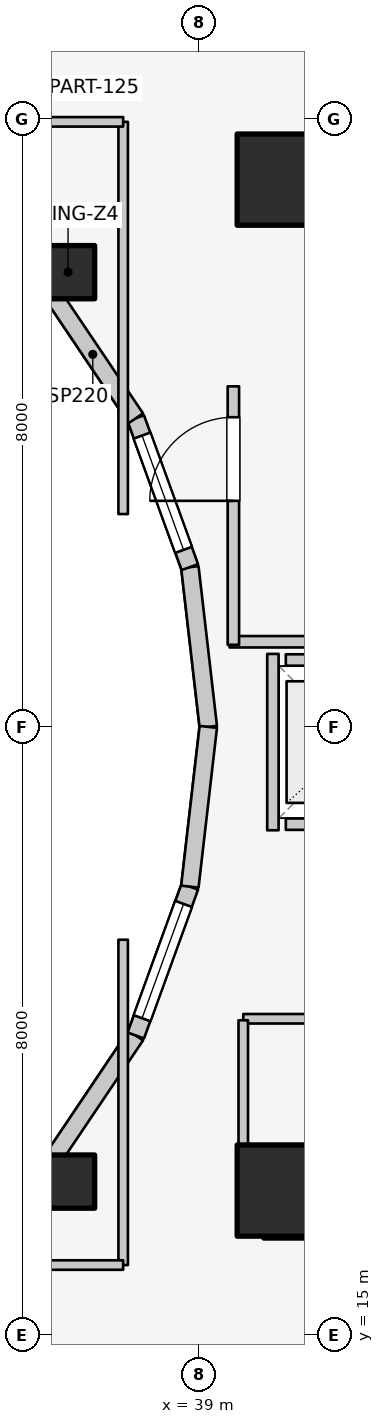
"""IFC4 building model, lengths in metres.
Left out: names, types, materials, properties, quantities, classifications, styles, units other than length and angle.
Written with IfcOpenShell. Run it as: python <this file> out.ifc"""

import sys

from ifc_helpers import new_model, si_unit, direction, frame, frame_2d, origin, origin_2d, place, context, subcontext, project, spatial, rectangle, extrude, element, fill, save


model = new_model("IFC4")
c1 = context("Model", 3, precision=1e-05, world=origin(), true_north=direction((0.0, 1.0)))
c2 = subcontext(c1, "Body", "Model", "MODEL_VIEW")
j1 = project(units=[si_unit("LENGTHUNIT", "METRE"), si_unit("PLANEANGLEUNIT", "RADIAN")], contexts=[c1])
p1 = place(None, origin())
s1 = spatial("IfcSite", under=j1, at=p1, CompositionType="ELEMENT")
p2 = place(p1, origin())
s2 = spatial("IfcBuilding", under=s1, at=p2, CompositionType="ELEMENT")
p3 = place(p2, frame((0.0, 0.0, 214.0)))
s3 = spatial("IfcBuildingStorey", under=s2, at=p3, CompositionType="ELEMENT", Elevation=214.0)
for number, where, z_axis, x_axis in (
    (1, (39.85, 16.55, 0.0), (0.0, 0.0, 1.0), (1.0, 0.0, 0.0)),
    (2, (39.85, 30.35, 0.0), (0.0, 0.0, 1.0), (1.0, 0.0, 0.0)),
):
    element("IfcWall", number, at=place(p3, frame(where, z_axis=z_axis, x_axis=x_axis)), inside=s3, PredefinedType="SHEAR", context=c2, shape_type="SweptSolid", body=[
        extrude(rectangle(XDim=4.5, YDim=0.55, at=frame_2d((2.25, 0.0))), origin(), (0.0, 0.0, 1.0), 3.1),
    ])
for number, where, z_axis, x_axis in (
    (3, (40.1, 16.9, 0.0), (0.0, 0.0, 1.0), (1.0, 0.0, 0.0)),
    (4, (40.1, 30.2, 0.0), (0.0, 0.0, 1.0), (1.0, 0.0, 0.0)),
):
    element("IfcColumn", number, at=place(p3, frame(where, z_axis=z_axis, x_axis=x_axis)), inside=s3, PredefinedType="COLUMN", context=c2, shape_type="SweptSolid", body=[
        extrude(rectangle(XDim=1.2, YDim=1.2, at=origin_2d()), origin(), (0.0, 0.0, 1.0), 3.1),
    ])
for number, where, z_axis, x_axis in (
    (5, (37.275, 28.982, 0.0), (0.0, 0.0, 1.0), (1.0, 0.0, 0.0)),
    (6, (37.275, 17.018, 0.0), (0.0, 0.0, 1.0), (1.0, 0.0, 0.0)),
):
    element("IfcColumn", number, at=place(p3, frame(where, z_axis=z_axis, x_axis=x_axis)), inside=s3, PredefinedType="COLUMN", context=c2, shape_type="SweptSolid", body=[
        extrude(rectangle(XDim=0.7, YDim=0.7, at=origin_2d()), origin(), (0.0, 0.0, 1.0), 3.1),
    ])
p4 = place(p3, frame((39.12, 23.0, 0.0), z_axis=(0.0, 0.0, 1.0), x_axis=(-0.114711713601, 0.993398823617, 0.0)))
e7 = element("IfcWall", 7, at=p4, inside=s3, PredefinedType="STANDARD", context=c2, shape_type="SweptSolid", body=[
    extrude(rectangle(XDim=2.115, YDim=0.23, at=frame_2d((1.058, 0.0))), origin(), (0.0, 0.0, 1.0), 2.84),
])
p5 = place(p3, frame((38.877, 25.102, 0.0), z_axis=(0.0, 0.0, 1.0), x_axis=(-0.341423187295, 0.93990968033, 0.0)))
e8 = element("IfcWall", 8, at=p5, inside=s3, PredefinedType="STANDARD", context=c2, shape_type="SweptSolid", body=[
    extrude(rectangle(XDim=2.084, YDim=0.23, at=frame_2d((1.042, 0.0))), origin(), (0.0, 0.0, 1.0), 2.84),
])
p6 = place(p5, frame((0.242, 0.0, 0.85)))
e9 = element("IfcOpeningElement", 9, at=p6, cuts=e8, PredefinedType="OPENING", context=c2, shape_type="SweptSolid", body=[
    extrude(rectangle(XDim=1.6, YDim=1.65, at=frame_2d((0.8, 0.825))), frame((0.0, 0.125, 0.0), z_axis=(0.0, -1.0, 0.0), x_axis=(1.0, 0.0, 0.0)), (0.0, 0.0, 1.0), 0.25),
])
p7 = place(p3, frame((38.166, 27.06, 0.0), z_axis=(0.0, 0.0, 1.0), x_axis=(-0.558197800898, 0.829707909492, 0.0)))
e10 = element("IfcWall", 10, at=p7, inside=s3, PredefinedType="STANDARD", context=c2, shape_type="SweptSolid", body=[
    extrude(rectangle(XDim=2.027, YDim=0.23, at=frame_2d((1.013, 0.0))), origin(), (0.0, 0.0, 1.0), 2.16),
])
for number, where, z_axis, x_axis in (
    (11, (37.035, 28.742, 0.0), (0.0, 0.0, 1.0), (-0.753, 0.659, 0.0)),
    (12, (35.56, 15.968, 0.0), (0.0, 0.0, 1.0), (0.753, 0.659, 0.0)),
):
    element("IfcWall", number, at=place(p3, frame(where, z_axis=z_axis, x_axis=x_axis)), inside=s3, PredefinedType="STANDARD", context=c2, shape_type="SweptSolid", body=[
        extrude(rectangle(XDim=1.959, YDim=0.23, at=frame_2d((0.98, 0.0))), origin(), (0.0, 0.0, 1.0), 2.16),
    ])
p8 = place(p3, frame((37.035, 17.258, 0.0), z_axis=(0.0, 0.0, 1.0), x_axis=(0.558197800898, 0.829707909492, 0.0)))
e13 = element("IfcWall", 13, at=p8, inside=s3, PredefinedType="STANDARD", context=c2, shape_type="SweptSolid", body=[
    extrude(rectangle(XDim=2.027, YDim=0.23, at=frame_2d((1.013, 0.0))), origin(), (0.0, 0.0, 1.0), 2.16),
])
p9 = place(p3, frame((38.166, 18.94, 0.0), z_axis=(0.0, 0.0, 1.0), x_axis=(0.341423187295, 0.93990968033, 0.0)))
e14 = element("IfcWall", 14, at=p9, inside=s3, PredefinedType="STANDARD", context=c2, shape_type="SweptSolid", body=[
    extrude(rectangle(XDim=2.084, YDim=0.23, at=frame_2d((1.042, 0.0))), origin(), (0.0, 0.0, 1.0), 2.84),
])
p10 = place(p9, frame((0.242, 0.0, 0.85)))
e15 = element("IfcOpeningElement", 15, at=p10, cuts=e14, PredefinedType="OPENING", context=c2, shape_type="SweptSolid", body=[
    extrude(rectangle(XDim=1.6, YDim=1.65, at=frame_2d((0.8, 0.825))), frame((0.0, 0.125, 0.0), z_axis=(0.0, -1.0, 0.0), x_axis=(1.0, 0.0, 0.0)), (0.0, 0.0, 1.0), 0.25),
])
p11 = place(p3, frame((38.877, 20.898, 0.0), z_axis=(0.0, 0.0, 1.0), x_axis=(0.114711713601, 0.993398823617, 0.0)))
e16 = element("IfcWall", 16, at=p11, inside=s3, PredefinedType="STANDARD", context=c2, shape_type="SweptSolid", body=[
    extrude(rectangle(XDim=2.115, YDim=0.23, at=frame_2d((1.058, 0.0))), origin(), (0.0, 0.0, 1.0), 2.84),
])
p12 = place(p3, frame((40.14, 21.72, 0.0), z_axis=(0.0, 0.0, 1.0), x_axis=(1.0, 0.0, 0.0)))
e17 = element("IfcWall", 17, at=p12, inside=s3, PredefinedType="SOLIDWALL", context=c2, shape_type="SweptSolid", body=[
    extrude(rectangle(XDim=1.82, YDim=0.15, at=frame_2d((0.91, 0.0))), origin(), (0.0, 0.0, 1.0), 2.12),
])
p13 = place(p12, frame((0.36, 0.0, 0.0)))
e18 = element("IfcOpeningElement", 18, at=p13, cuts=e17, PredefinedType="OPENING", context=c2, shape_type="SweptSolid", body=[
    extrude(rectangle(XDim=1.1, YDim=2.1, at=frame_2d((0.55, 1.05))), frame((0.0, 0.085, 0.0), z_axis=(0.0, -1.0, 0.0), x_axis=(1.0, 0.0, 0.0)), (0.0, 0.0, 1.0), 0.17),
])
p14 = place(p3, frame((40.14, 23.88, 0.0), z_axis=(0.0, 0.0, 1.0), x_axis=(1.0, 0.0, 0.0)))
e19 = element("IfcWall", 19, at=p14, inside=s3, PredefinedType="SOLIDWALL", context=c2, shape_type="SweptSolid", body=[
    extrude(rectangle(XDim=1.82, YDim=0.15, at=frame_2d((0.91, 0.0))), origin(), (0.0, 0.0, 1.0), 2.12),
])
p15 = place(p3, frame((39.97, 21.64, 0.0), z_axis=(0.0, 0.0, 1.0), x_axis=(0.0, 1.0, 0.0)))
e20 = element("IfcWall", 20, at=p15, inside=s3, PredefinedType="SOLIDWALL", context=c2, shape_type="SweptSolid", body=[
    extrude(rectangle(XDim=2.32, YDim=0.15, at=frame_2d((1.16, 0.0))), origin(), (0.0, 0.0, 1.0), 2.12),
])
p16 = place(p3, frame((39.4, 24.12, 0.0), z_axis=(0.0, 0.0, 1.0), x_axis=(1.0, 0.0, 0.0)))
e21 = element("IfcWall", 21, at=p16, inside=s3, PredefinedType="PARTITIONING", context=c2, shape_type="SweptSolid", body=[
    extrude(rectangle(XDim=5.08, YDim=0.15, at=frame_2d((2.54, 0.0))), origin(), (0.0, 0.0, 1.0), 2.12),
])
p17 = place(p3, frame((39.45, 24.08, 0.0), z_axis=(0.0, 0.0, 1.0), x_axis=(0.0, 1.0, 0.0)))
e22 = element("IfcWall", 22, at=p17, inside=s3, PredefinedType="PARTITIONING", context=c2, shape_type="SweptSolid", body=[
    extrude(rectangle(XDim=3.4, YDim=0.15, at=frame_2d((1.7, 0.0))), origin(), (0.0, 0.0, 1.0), 2.855),
])
p18 = place(p17, frame((1.894, 0.0, 0.0)))
e23 = element("IfcOpeningElement", 23, at=p18, cuts=e22, PredefinedType="OPENING", context=c2, shape_type="SweptSolid", body=[
    extrude(rectangle(XDim=1.1, YDim=2.1, at=frame_2d((0.55, 1.05))), frame((0.0, 0.085, 0.0), z_axis=(0.0, -1.0, 0.0), x_axis=(1.0, 0.0, 0.0)), (0.0, 0.0, 1.0), 0.17),
])
p19 = place(p3, frame((39.58, 19.16, 0.0), z_axis=(0.0, 0.0, 1.0), x_axis=(1.0, 0.0, 0.0)))
e24 = element("IfcWall", 24, at=p19, inside=s3, PredefinedType="PARTITIONING", context=c2, shape_type="SweptSolid", body=[
    extrude(rectangle(XDim=4.87, YDim=0.125, at=frame_2d((2.435, 0.0))), origin(), (0.0, 0.0, 1.0), 2.12),
])
p20 = place(p19, frame((1.748, 0.0, 0.0)))
e25 = element("IfcOpeningElement", 25, at=p20, cuts=e24, PredefinedType="OPENING", context=c2, shape_type="SweptSolid", body=[
    extrude(rectangle(XDim=0.85, YDim=2.05, at=frame_2d((0.425, 1.025))), frame((0.0, 0.073, 0.0), z_axis=(0.0, -1.0, 0.0), x_axis=(1.0, 0.0, 0.0)), (0.0, 0.0, 1.0), 0.145),
])
p21 = place(p3, frame((39.58, 17.1, 0.0), z_axis=(0.0, 0.0, 1.0), x_axis=(0.0, 1.0, 0.0)))
e26 = element("IfcWall", 26, at=p21, inside=s3, PredefinedType="PARTITIONING", context=c2, shape_type="SweptSolid", body=[
    extrude(rectangle(XDim=2.04, YDim=0.125, at=frame_2d((1.02, 0.0))), origin(), (0.0, 0.0, 1.0), 2.232),
])
p22 = place(p3, frame((35.55, 30.015, 0.0), z_axis=(0.0, 0.0, 1.0), x_axis=(0.522763432117, 0.852477796802, 0.0)))
e27 = element("IfcWall", 27, at=p22, inside=s3, PredefinedType="PARTITIONING", context=c2, shape_type="SweptSolid", body=[
    extrude(rectangle(XDim=3.269, YDim=0.125, at=frame_2d((1.635, 0.0))), origin(), (0.0, 0.0, 1.0), 2.376),
])
p23 = place(p3, frame((35.55, 15.985, 0.0), z_axis=(0.0, 0.0, 1.0), x_axis=(0.52592395012, -0.850531597702, 0.0)))
e28 = element("IfcWall", 28, at=p23, inside=s3, PredefinedType="PARTITIONING", context=c2, shape_type="SweptSolid", body=[
    extrude(rectangle(XDim=2.869, YDim=0.125, at=frame_2d((1.435, 0.0))), origin(), (0.0, 0.0, 1.0), 2.376),
])
p24 = place(p3, frame((38.0, 25.8, 0.0), z_axis=(0.0, 0.0, 1.0), x_axis=(0.0, 1.0, 0.0)))
e29 = element("IfcWall", 29, at=p24, inside=s3, PredefinedType="PARTITIONING", context=c2, shape_type="SweptSolid", body=[
    extrude(rectangle(XDim=5.16, YDim=0.125, at=frame_2d((2.58, 0.0))), origin(), (0.0, 0.0, 1.0), 2.232),
])
p25 = place(p3, frame((35.4, 30.96, 0.0), z_axis=(0.0, 0.0, 1.0), x_axis=(1.0, 0.0, 0.0)))
e30 = element("IfcWall", 30, at=p25, inside=s3, PredefinedType="PARTITIONING", context=c2, shape_type="SweptSolid", body=[
    extrude(rectangle(XDim=2.6, YDim=0.125, at=frame_2d((1.3, 0.0))), origin(), (0.0, 0.0, 1.0), 2.376),
])
p26 = place(p3, frame((38.0, 15.92, 0.0), z_axis=(0.0, 0.0, 1.0), x_axis=(0.0, 1.0, 0.0)))
e31 = element("IfcWall", 31, at=p26, inside=s3, PredefinedType="PARTITIONING", context=c2, shape_type="SweptSolid", body=[
    extrude(rectangle(XDim=4.28, YDim=0.125, at=frame_2d((2.14, 0.0))), origin(), (0.0, 0.0, 1.0), 2.232),
])
p27 = place(p3, frame((35.4, 15.92, 0.0), z_axis=(0.0, 0.0, 1.0), x_axis=(1.0, 0.0, 0.0)))
e32 = element("IfcWall", 32, at=p27, inside=s3, PredefinedType="PARTITIONING", context=c2, shape_type="SweptSolid", body=[
    extrude(rectangle(XDim=2.6, YDim=0.125, at=frame_2d((1.3, 0.0))), origin(), (0.0, 0.0, 1.0), 2.232),
])
p28 = place(p6, origin())
e33 = element("IfcWindow", 33, at=p28, inside=s3, PartitioningType="SINGLE_PANEL", PredefinedType="WINDOW", context=c2, shape_type="SweptSolid", body=[
    extrude(rectangle(XDim=1.6, YDim=1.65, at=frame_2d((0.8, 0.825))), frame((0.0, 0.03, 0.0), z_axis=(0.0, -1.0, 0.0), x_axis=(1.0, 0.0, 0.0)), (0.0, 0.0, 1.0), 0.06),
])
fill(e9, e33)
p29 = place(p10, origin())
e34 = element("IfcWindow", 34, at=p29, inside=s3, PartitioningType="SINGLE_PANEL", PredefinedType="WINDOW", context=c2, shape_type="SweptSolid", body=[
    extrude(rectangle(XDim=1.6, YDim=1.65, at=frame_2d((0.8, 0.825))), frame((0.0, 0.03, 0.0), z_axis=(0.0, -1.0, 0.0), x_axis=(1.0, 0.0, 0.0)), (0.0, 0.0, 1.0), 0.06),
])
fill(e15, e34)
p30 = place(p18, origin())
e35 = element("IfcDoor", 35, at=p30, inside=s3, OperationType="SINGLE_SWING_LEFT", PredefinedType="DOOR", context=c2, shape_type="SweptSolid", body=[
    extrude(rectangle(XDim=1.1, YDim=2.1, at=frame_2d((0.55, 1.05))), frame((0.0, 0.025, 0.0), z_axis=(0.0, -1.0, 0.0), x_axis=(1.0, 0.0, 0.0)), (0.0, 0.0, 1.0), 0.05),
])
fill(e23, e35)
save(model, sys.argv[1])
